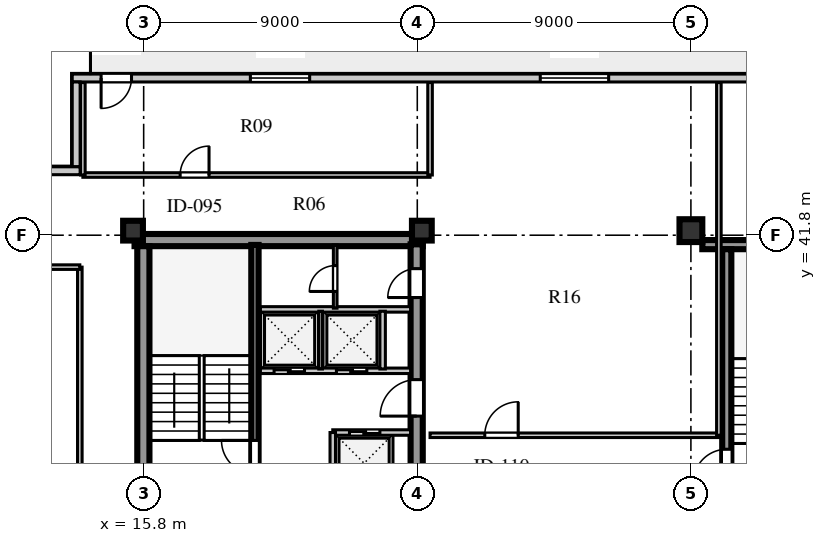
"""IFC4 building model, lengths in metres.
Left out: names, types, materials, properties, quantities, classifications, styles, units other than length and angle.
Written with IfcOpenShell. Run it as: python <this file> out.ifc"""

import sys

from ifc_helpers import new_model, si_unit, direction, frame, frame_2d, origin, origin_2d, place, context, subcontext, project, spatial, rectangle, extrude, element, fill, save


model = new_model("IFC4")
c1 = context("Model", 3, precision=1e-05, world=origin(), true_north=direction((0.0, 1.0)))
c2 = subcontext(c1, "Body", "Model", "MODEL_VIEW")
j1 = project(units=[si_unit("LENGTHUNIT", "METRE"), si_unit("PLANEANGLEUNIT", "RADIAN")], contexts=[c1])
p1 = place(None, origin())
s1 = spatial("IfcSite", under=j1, at=p1, CompositionType="ELEMENT")
p2 = place(p1, origin())
s2 = spatial("IfcBuilding", under=s1, at=p2, CompositionType="ELEMENT")
p3 = place(p2, frame((0.0, 0.0, 320.1)))
s3 = spatial("IfcBuildingStorey", under=s2, at=p3, CompositionType="ELEMENT", Elevation=320.1)
p4 = place(p3, frame((15.5, 41.64, 0.0), z_axis=(0.0, 0.0, 1.0), x_axis=(1.0, 0.0, 0.0)))
e1 = element("IfcWall", 1, at=p4, inside=s3, PredefinedType="SHEAR", context=c2, shape_type="SweptSolid", body=[
    extrude(rectangle(XDim=9.48, YDim=0.4, at=frame_2d((4.74, 0.0))), origin(), (0.0, 0.0, 1.0), 3.56),
])
p5 = place(p3, frame((15.79, 15.81, 0.0), z_axis=(0.0, 0.0, 1.0), x_axis=(0.0, 1.0, 0.0)))
e2 = element("IfcWall", 2, at=p5, inside=s3, PredefinedType="SHEAR", context=c2, shape_type="SweptSolid", body=[
    extrude(rectangle(XDim=25.63, YDim=0.4, at=frame_2d((12.815, 0.0))), origin(), (0.0, 0.0, 1.0), 3.56),
])
p6 = place(p3, frame((24.78, 15.74, 0.0), z_axis=(0.0, 0.0, 1.0), x_axis=(0.0, 1.0, 0.0)))
e3 = element("IfcWall", 3, at=p6, inside=s3, PredefinedType="SHEAR", context=c2, shape_type="SweptSolid", body=[
    extrude(rectangle(XDim=25.76, YDim=0.4, at=frame_2d((12.88, 0.0))), origin(), (0.0, 0.0, 1.0), 3.56),
])
p7 = place(p6, frame((1.61, 0.0, 0.0)))
e4 = element("IfcOpeningElement", 4, at=p7, cuts=e3, PredefinedType="OPENING", context=c2, shape_type="SweptSolid", body=[
    extrude(rectangle(XDim=1.2, YDim=2.1, at=frame_2d((0.6, 1.05))), frame((0.0, 0.21, 0.0), z_axis=(0.0, -1.0, 0.0), x_axis=(1.0, 0.0, 0.0)), (0.0, 0.0, 1.0), 0.42),
])
p8 = place(p6, frame((6.78, 0.0, 0.0)))
e5 = element("IfcOpeningElement", 5, at=p8, cuts=e3, PredefinedType="OPENING", context=c2, shape_type="SweptSolid", body=[
    extrude(rectangle(XDim=0.85, YDim=2.06, at=frame_2d((0.425, 1.03))), frame((0.0, 0.21, 0.0), z_axis=(0.0, -1.0, 0.0), x_axis=(1.0, 0.0, 0.0)), (0.0, 0.0, 1.0), 0.42),
])
p9 = place(p6, frame((12.11, 0.0, 0.0)))
e6 = element("IfcOpeningElement", 6, at=p9, cuts=e3, PredefinedType="OPENING", context=c2, shape_type="SweptSolid", body=[
    extrude(rectangle(XDim=1.5, YDim=2.12, at=frame_2d((0.75, 1.06))), frame((0.0, 0.21, 0.0), z_axis=(0.0, -1.0, 0.0), x_axis=(1.0, 0.0, 0.0)), (0.0, 0.0, 1.0), 0.42),
])
p10 = place(p6, frame((20.11, 0.0, 0.0)))
e7 = element("IfcOpeningElement", 7, at=p10, cuts=e3, PredefinedType="OPENING", context=c2, shape_type="SweptSolid", body=[
    extrude(rectangle(XDim=1.2, YDim=2.12, at=frame_2d((0.6, 1.06))), frame((0.0, 0.21, 0.0), z_axis=(0.0, -1.0, 0.0), x_axis=(1.0, 0.0, 0.0)), (0.0, 0.0, 1.0), 0.42),
])
p11 = place(p6, frame((24.01, 0.0, 0.0)))
e8 = element("IfcOpeningElement", 8, at=p11, cuts=e3, PredefinedType="OPENING", context=c2, shape_type="SweptSolid", body=[
    extrude(rectangle(XDim=0.95, YDim=2.1, at=frame_2d((0.475, 1.05))), frame((0.0, 0.21, 0.0), z_axis=(0.0, -1.0, 0.0), x_axis=(1.0, 0.0, 0.0)), (0.0, 0.0, 1.0), 0.42),
])
p12 = place(p3, frame((34.175, 41.49, 0.0), z_axis=(0.0, 0.0, 1.0), x_axis=(1.0, 0.0, 0.0)))
e9 = element("IfcWall", 9, at=p12, inside=s3, PredefinedType="SHEAR", context=c2, shape_type="SweptSolid", body=[
    extrude(rectangle(XDim=4.695, YDim=0.3, at=frame_2d((2.348, 0.0))), origin(), (0.0, 0.0, 1.0), 3.56),
])
p13 = place(p3, frame((34.98, 33.31, 0.0), z_axis=(0.0, 0.0, 1.0), x_axis=(0.0, 1.0, 0.0)))
e10 = element("IfcWall", 10, at=p13, inside=s3, PredefinedType="SHEAR", context=c2, shape_type="SweptSolid", body=[
    extrude(rectangle(XDim=8.03, YDim=0.3, at=frame_2d((4.015, 0.0))), origin(), (0.0, 0.0, 1.0), 3.56),
])
p14 = place(p13, frame((0.35, 0.0, 0.0)))
e11 = element("IfcOpeningElement", 11, at=p14, cuts=e10, PredefinedType="OPENING", context=c2, shape_type="SweptSolid", body=[
    extrude(rectangle(XDim=1.1, YDim=2.1, at=frame_2d((0.55, 1.05))), frame((0.0, 0.16, 0.0), z_axis=(0.0, -1.0, 0.0), x_axis=(1.0, 0.0, 0.0)), (0.0, 0.0, 1.0), 0.32),
])
for number, where, z_axis, x_axis in (
    (12, (15.45, 41.95, 0.0), (0.0, 0.0, 1.0), (1.0, 0.0, 0.0)),
    (13, (24.95, 41.95, 0.0), (0.0, 0.0, 1.0), (1.0, 0.0, 0.0)),
):
    element("IfcColumn", number, at=place(p3, frame(where, z_axis=z_axis, x_axis=x_axis)), inside=s3, PredefinedType="COLUMN", context=c2, shape_type="SweptSolid", body=[
        extrude(rectangle(XDim=0.65, YDim=0.65, at=origin_2d()), origin(), (0.0, 0.0, 1.0), 3.56),
    ])
p15 = place(p3, frame((33.8, 41.95, 0.0), z_axis=(0.0, 0.0, 1.0), x_axis=(1.0, 0.0, 0.0)))
e14 = element("IfcColumn", 14, at=p15, inside=s3, PredefinedType="COLUMN", context=c2, shape_type="SweptSolid", body=[
    extrude(rectangle(XDim=0.75, YDim=0.75, at=origin_2d()), origin(), (0.0, 0.0, 1.0), 3.56),
])
p16 = place(p3, frame((45.15, 46.97, 0.0), z_axis=(0.0, 0.0, 1.0), x_axis=(-1.0, 0.0, 0.0)))
e15 = element("IfcWall", 15, at=p16, inside=s3, PredefinedType="SOLIDWALL", context=c2, shape_type="SweptSolid", body=[
    extrude(rectangle(XDim=31.7, YDim=0.26, at=frame_2d((15.85, 0.0))), origin(), (0.0, 0.0, 1.0), 3.56),
])
p17 = place(p16, frame((29.75, 0.0, 0.0)))
e16 = element("IfcOpeningElement", 16, at=p17, cuts=e15, PredefinedType="OPENING", context=c2, shape_type="SweptSolid", body=[
    extrude(rectangle(XDim=1.0, YDim=2.05, at=frame_2d((0.5, 1.025))), frame((0.0, 0.14, 0.0), z_axis=(0.0, -1.0, 0.0), x_axis=(1.0, 0.0, 0.0)), (0.0, 0.0, 1.0), 0.28),
])
p18 = place(p16, frame((23.89, 0.0, 0.8)))
e17 = element("IfcOpeningElement", 17, at=p18, cuts=e15, PredefinedType="OPENING", context=c2, shape_type="SweptSolid", body=[
    extrude(rectangle(XDim=1.95, YDim=2.0, at=frame_2d((0.975, 1.0))), frame((0.0, 0.14, 0.0), z_axis=(0.0, -1.0, 0.0), x_axis=(1.0, 0.0, 0.0)), (0.0, 0.0, 1.0), 0.28),
])
p19 = place(p16, frame((14.055, 0.0, 0.8)))
e18 = element("IfcOpeningElement", 18, at=p19, cuts=e15, PredefinedType="OPENING", context=c2, shape_type="SweptSolid", body=[
    extrude(rectangle(XDim=2.25, YDim=2.0, at=frame_2d((1.125, 1.0))), frame((0.0, 0.14, 0.0), z_axis=(0.0, -1.0, 0.0), x_axis=(1.0, 0.0, 0.0)), (0.0, 0.0, 1.0), 0.28),
])
p20 = place(p16, frame((4.37, 0.0, 0.8)))
e19 = element("IfcOpeningElement", 19, at=p20, cuts=e15, PredefinedType="OPENING", context=c2, shape_type="SweptSolid", body=[
    extrude(rectangle(XDim=1.8, YDim=2.0, at=frame_2d((0.9, 1.0))), frame((0.0, 0.14, 0.0), z_axis=(0.0, -1.0, 0.0), x_axis=(1.0, 0.0, 0.0)), (0.0, 0.0, 1.0), 0.28),
])
p21 = place(p3, frame((13.58, 46.84, 0.0), z_axis=(0.0, 0.0, 1.0), x_axis=(0.0, -1.0, 0.0)))
e20 = element("IfcWall", 20, at=p21, inside=s3, PredefinedType="SOLIDWALL", context=c2, shape_type="SweptSolid", body=[
    extrude(rectangle(XDim=2.79, YDim=0.26, at=frame_2d((1.395, 0.0))), origin(), (0.0, 0.0, 1.0), 3.56),
])
p22 = place(p3, frame((13.71, 43.92, 0.0), z_axis=(0.0, 0.0, 1.0), x_axis=(-1.0, 0.0, 0.0)))
e21 = element("IfcWall", 21, at=p22, inside=s3, PredefinedType="SOLIDWALL", context=c2, shape_type="SweptSolid", body=[
    extrude(rectangle(XDim=3.31, YDim=0.26, at=frame_2d((1.655, 0.0))), origin(), (0.0, 0.0, 1.0), 3.56),
])
p23 = place(p3, frame((19.46, 33.3, 0.0), z_axis=(0.0, 0.0, 1.0), x_axis=(0.0, 1.0, 0.0)))
e22 = element("IfcWall", 22, at=p23, inside=s3, PredefinedType="SHEAR", context=c2, shape_type="SweptSolid", body=[
    extrude(rectangle(XDim=8.18, YDim=0.24, at=frame_2d((4.09, 0.0))), origin(), (0.0, 0.0, 1.0), 3.8),
])
p24 = place(p23, frame((0.65, 0.0, 0.0)))
e23 = element("IfcOpeningElement", 23, at=p24, cuts=e22, PredefinedType="OPENING", context=c2, shape_type="SweptSolid", body=[
    extrude(rectangle(XDim=1.1, YDim=2.1, at=frame_2d((0.55, 1.05))), frame((0.0, 0.13, 0.0), z_axis=(0.0, -1.0, 0.0), x_axis=(1.0, 0.0, 0.0)), (0.0, 0.0, 1.0), 0.26),
])
p25 = place(p3, frame((22.02, 35.31, 0.0), z_axis=(0.0, 0.0, 1.0), x_axis=(1.0, 0.0, 0.0)))
e24 = element("IfcWall", 24, at=p25, inside=s3, PredefinedType="SOLIDWALL", context=c2, shape_type="SweptSolid", body=[
    extrude(rectangle(XDim=2.56, YDim=0.18, at=frame_2d((1.28, 0.0))), origin(), (0.0, 0.0, 1.0), 3.56),
])
p26 = place(p25, frame((0.55, 0.0, 0.0)))
e25 = element("IfcOpeningElement", 25, at=p26, cuts=e24, PredefinedType="OPENING", context=c2, shape_type="SweptSolid", body=[
    extrude(rectangle(XDim=1.0, YDim=2.1, at=frame_2d((0.5, 1.05))), frame((0.0, 0.1, 0.0), z_axis=(0.0, -1.0, 0.0), x_axis=(1.0, 0.0, 0.0)), (0.0, 0.0, 1.0), 0.2),
])
p27 = place(p3, frame((22.02, 33.3, 0.0), z_axis=(0.0, 0.0, 1.0), x_axis=(0.0, 1.0, 0.0)))
e26 = element("IfcWall", 26, at=p27, inside=s3, PredefinedType="SOLIDWALL", context=c2, shape_type="SweptSolid", body=[
    extrude(rectangle(XDim=2.01, YDim=0.18, at=frame_2d((1.005, 0.0))), origin(), (0.0, 0.0, 1.0), 3.56),
])
p28 = place(p3, frame((19.64, 37.34, 0.0), z_axis=(0.0, 0.0, 1.0), x_axis=(1.0, 0.0, 0.0)))
e27 = element("IfcWall", 27, at=p28, inside=s3, PredefinedType="SOLIDWALL", context=c2, shape_type="SweptSolid", body=[
    extrude(rectangle(XDim=4.94, YDim=0.18, at=frame_2d((2.47, 0.0))), origin(), (0.0, 0.0, 1.0), 3.56),
])
p29 = place(p28, frame((0.45, 0.0, 0.0)))
e28 = element("IfcOpeningElement", 28, at=p29, cuts=e27, PredefinedType="OPENING", context=c2, shape_type="SweptSolid", body=[
    extrude(rectangle(XDim=1.0, YDim=2.1, at=frame_2d((0.5, 1.05))), frame((0.0, 0.1, 0.0), z_axis=(0.0, -1.0, 0.0), x_axis=(1.0, 0.0, 0.0)), (0.0, 0.0, 1.0), 0.2),
])
p30 = place(p28, frame((2.5, 0.0, 0.0)))
e29 = element("IfcOpeningElement", 29, at=p30, cuts=e27, PredefinedType="OPENING", context=c2, shape_type="SweptSolid", body=[
    extrude(rectangle(XDim=1.0, YDim=2.1, at=frame_2d((0.5, 1.05))), frame((0.0, 0.1, 0.0), z_axis=(0.0, -1.0, 0.0), x_axis=(1.0, 0.0, 0.0)), (0.0, 0.0, 1.0), 0.2),
])
p31 = place(p3, frame((19.64, 39.36, 0.0), z_axis=(0.0, 0.0, 1.0), x_axis=(1.0, 0.0, 0.0)))
e30 = element("IfcWall", 30, at=p31, inside=s3, PredefinedType="SOLIDWALL", context=c2, shape_type="SweptSolid", body=[
    extrude(rectangle(XDim=4.94, YDim=0.18, at=frame_2d((2.47, 0.0))), origin(), (0.0, 0.0, 1.0), 3.56),
])
p32 = place(p3, frame((21.62, 37.4, 0.0), z_axis=(0.0, 0.0, 1.0), x_axis=(0.0, 1.0, 0.0)))
e31 = element("IfcWall", 31, at=p32, inside=s3, PredefinedType="PARTITIONING", context=c2, shape_type="SweptSolid", body=[
    extrude(rectangle(XDim=1.9, YDim=0.12, at=frame_2d((0.95, 0.0))), origin(), (0.0, 0.0, 1.0), 3.56),
])
p33 = place(p3, frame((23.66, 37.4, 0.0), z_axis=(0.0, 0.0, 1.0), x_axis=(0.0, 1.0, 0.0)))
e32 = element("IfcWall", 32, at=p33, inside=s3, PredefinedType="SOLIDWALL", context=c2, shape_type="SweptSolid", body=[
    extrude(rectangle(XDim=1.9, YDim=0.18, at=frame_2d((0.95, 0.0))), origin(), (0.0, 0.0, 1.0), 3.56),
])
p34 = place(p3, frame((22.1, 39.4, 0.0), z_axis=(0.0, 0.0, 1.0), x_axis=(0.0, 1.0, 0.0)))
e33 = element("IfcWall", 33, at=p34, inside=s3, PredefinedType="PARTITIONING", context=c2, shape_type="SweptSolid", body=[
    extrude(rectangle(XDim=2.08, YDim=0.12, at=frame_2d((1.04, 0.0))), origin(), (0.0, 0.0, 1.0), 3.56),
])
p35 = place(p34, frame((0.55, 0.0, 0.0)))
e34 = element("IfcOpeningElement", 34, at=p35, cuts=e33, PredefinedType="OPENING", context=c2, shape_type="SweptSolid", body=[
    extrude(rectangle(XDim=0.85, YDim=2.06, at=frame_2d((0.425, 1.03))), frame((0.0, 0.07, 0.0), z_axis=(0.0, -1.0, 0.0), x_axis=(1.0, 0.0, 0.0)), (0.0, 0.0, 1.0), 0.14),
])
p36 = place(p3, frame((25.22, 35.22, 0.0), z_axis=(0.0, 0.0, 1.0), x_axis=(1.0, 0.0, 0.0)))
e35 = element("IfcWall", 35, at=p36, inside=s3, PredefinedType="PARTITIONING", context=c2, shape_type="SweptSolid", body=[
    extrude(rectangle(XDim=9.5, YDim=0.15, at=frame_2d((4.75, 0.0))), origin(), (0.0, 0.0, 1.0), 3.56),
])
p37 = place(p36, frame((1.8, 0.0, 0.0)))
e36 = element("IfcOpeningElement", 36, at=p37, cuts=e35, PredefinedType="OPENING", context=c2, shape_type="SweptSolid", body=[
    extrude(rectangle(XDim=1.1, YDim=2.08, at=frame_2d((0.55, 1.04))), frame((0.0, 0.085, 0.0), z_axis=(0.0, -1.0, 0.0), x_axis=(1.0, 0.0, 0.0)), (0.0, 0.0, 1.0), 0.17),
])
p38 = place(p3, frame((13.8, 43.78, 0.0), z_axis=(0.0, 0.0, 1.0), x_axis=(1.0, 0.0, 0.0)))
e37 = element("IfcWall", 37, at=p38, inside=s3, PredefinedType="PARTITIONING", context=c2, shape_type="SweptSolid", body=[
    extrude(rectangle(XDim=11.42, YDim=0.15, at=frame_2d((5.71, 0.0))), origin(), (0.0, 0.0, 1.0), 3.56),
])
p39 = place(p38, frame((3.2, 0.0, 0.0)))
e38 = element("IfcOpeningElement", 38, at=p39, cuts=e37, PredefinedType="OPENING", context=c2, shape_type="SweptSolid", body=[
    extrude(rectangle(XDim=0.95, YDim=2.08, at=frame_2d((0.475, 1.04))), frame((0.0, 0.085, 0.0), z_axis=(0.0, -1.0, 0.0), x_axis=(1.0, 0.0, 0.0)), (0.0, 0.0, 1.0), 0.17),
])
p40 = place(p3, frame((13.8, 43.78, 0.0), z_axis=(0.0, 0.0, 1.0), x_axis=(0.0, 1.0, 0.0)))
e39 = element("IfcWall", 39, at=p40, inside=s3, PredefinedType="PARTITIONING", context=c2, shape_type="SweptSolid", body=[
    extrude(rectangle(XDim=3.04, YDim=0.15, at=frame_2d((1.52, 0.0))), origin(), (0.0, 0.0, 1.0), 3.56),
])
p41 = place(p3, frame((25.22, 43.78, 0.0), z_axis=(0.0, 0.0, 1.0), x_axis=(0.0, 1.0, 0.0)))
e40 = element("IfcWall", 40, at=p41, inside=s3, PredefinedType="PARTITIONING", context=c2, shape_type="SweptSolid", body=[
    extrude(rectangle(XDim=3.04, YDim=0.15, at=frame_2d((1.52, 0.0))), origin(), (0.0, 0.0, 1.0), 3.11),
])
p42 = place(p3, frame((13.7, 16.45, 0.0), z_axis=(0.0, 0.0, 1.0), x_axis=(0.0, 1.0, 0.0)))
e41 = element("IfcWall", 41, at=p42, inside=s3, PredefinedType="PARTITIONING", context=c2, shape_type="SweptSolid", body=[
    extrude(rectangle(XDim=24.3, YDim=0.15, at=frame_2d((12.15, 0.0))), origin(), (0.0, 0.0, 1.0), 3.56),
])
p43 = place(p42, frame((5.1, 0.0, 0.0)))
e42 = element("IfcOpeningElement", 42, at=p43, cuts=e41, PredefinedType="OPENING", context=c2, shape_type="SweptSolid", body=[
    extrude(rectangle(XDim=0.95, YDim=2.08, at=frame_2d((0.475, 1.04))), frame((0.0, 0.085, 0.0), z_axis=(0.0, -1.0, 0.0), x_axis=(1.0, 0.0, 0.0)), (0.0, 0.0, 1.0), 0.17),
])
p44 = place(p3, frame((10.68, 40.75, 0.0), z_axis=(0.0, 0.0, 1.0), x_axis=(1.0, 0.0, 0.0)))
e43 = element("IfcWall", 43, at=p44, inside=s3, PredefinedType="PARTITIONING", context=c2, shape_type="SweptSolid", body=[
    extrude(rectangle(XDim=3.02, YDim=0.15, at=frame_2d((1.51, 0.0))), origin(), (0.0, 0.0, 1.0), 3.56),
])
p45 = place(p3, frame((34.72, 35.22, 0.0), z_axis=(0.0, 0.0, 1.0), x_axis=(0.0, 1.0, 0.0)))
e44 = element("IfcWall", 44, at=p45, inside=s3, PredefinedType="PARTITIONING", context=c2, shape_type="SweptSolid", body=[
    extrude(rectangle(XDim=11.6, YDim=0.15, at=frame_2d((5.8, 0.0))), origin(), (0.0, 0.0, 1.0), 3.56),
])
p46 = place(p17, frame((1.0, 0.0, 0.0), z_axis=(0.0, 0.0, 1.0), x_axis=(-1.0, 0.0, 0.0)))
e45 = element("IfcDoor", 45, at=p46, inside=s3, OperationType="SINGLE_SWING_LEFT", PredefinedType="DOOR", context=c2, shape_type="SweptSolid", body=[
    extrude(rectangle(XDim=1.0, YDim=2.05, at=frame_2d((0.5, 1.025))), frame((0.0, 0.025, 0.0), z_axis=(0.0, -1.0, 0.0), x_axis=(1.0, 0.0, 0.0)), (0.0, 0.0, 1.0), 0.05),
])
fill(e16, e45)
p47 = place(p18, origin())
e46 = element("IfcWindow", 46, at=p47, inside=s3, PartitioningType="SINGLE_PANEL", PredefinedType="WINDOW", context=c2, shape_type="SweptSolid", body=[
    extrude(rectangle(XDim=1.95, YDim=2.0, at=frame_2d((0.975, 1.0))), frame((0.0, 0.03, 0.0), z_axis=(0.0, -1.0, 0.0), x_axis=(1.0, 0.0, 0.0)), (0.0, 0.0, 1.0), 0.06),
])
fill(e17, e46)
p48 = place(p19, origin())
e47 = element("IfcWindow", 47, at=p48, inside=s3, PartitioningType="SINGLE_PANEL", PredefinedType="WINDOW", context=c2, shape_type="SweptSolid", body=[
    extrude(rectangle(XDim=2.25, YDim=2.0, at=frame_2d((1.125, 1.0))), frame((0.0, 0.03, 0.0), z_axis=(0.0, -1.0, 0.0), x_axis=(1.0, 0.0, 0.0)), (0.0, 0.0, 1.0), 0.06),
])
fill(e18, e47)
p49 = place(p24, origin())
e48 = element("IfcDoor", 48, at=p49, inside=s3, OperationType="SINGLE_SWING_RIGHT", PredefinedType="DOOR", context=c2, shape_type="SweptSolid", body=[
    extrude(rectangle(XDim=1.1, YDim=2.1, at=frame_2d((0.55, 1.05))), frame((0.0, 0.025, 0.0), z_axis=(0.0, -1.0, 0.0), x_axis=(1.0, 0.0, 0.0)), (0.0, 0.0, 1.0), 0.05),
])
fill(e23, e48)
p50 = place(p10, frame((1.2, 0.0, 0.0), z_axis=(0.0, 0.0, 1.0), x_axis=(-1.0, 0.0, 0.0)))
e49 = element("IfcDoor", 49, at=p50, inside=s3, OperationType="SINGLE_SWING_RIGHT", PredefinedType="DOOR", context=c2, shape_type="SweptSolid", body=[
    extrude(rectangle(XDim=1.2, YDim=2.12, at=frame_2d((0.6, 1.06))), frame((0.0, 0.025, 0.0), z_axis=(0.0, -1.0, 0.0), x_axis=(1.0, 0.0, 0.0)), (0.0, 0.0, 1.0), 0.05),
])
fill(e7, e49)
p51 = place(p29, frame((1.0, 0.0, 0.0), z_axis=(0.0, 0.0, 1.0), x_axis=(-1.0, 0.0, 0.0)))
e50 = element("IfcDoor", 50, at=p51, inside=s3, OperationType="DOUBLE_DOOR_SLIDING", PredefinedType="DOOR", context=c2, shape_type="SweptSolid", body=[
    extrude(rectangle(XDim=1.0, YDim=2.1, at=frame_2d((0.5, 1.05))), frame((0.0, 0.025, 0.0), z_axis=(0.0, -1.0, 0.0), x_axis=(1.0, 0.0, 0.0)), (0.0, 0.0, 1.0), 0.05),
])
fill(e28, e50)
p52 = place(p30, frame((1.0, 0.0, 0.0), z_axis=(0.0, 0.0, 1.0), x_axis=(-1.0, 0.0, 0.0)))
e51 = element("IfcDoor", 51, at=p52, inside=s3, OperationType="DOUBLE_DOOR_SLIDING", PredefinedType="DOOR", context=c2, shape_type="SweptSolid", body=[
    extrude(rectangle(XDim=1.0, YDim=2.1, at=frame_2d((0.5, 1.05))), frame((0.0, 0.025, 0.0), z_axis=(0.0, -1.0, 0.0), x_axis=(1.0, 0.0, 0.0)), (0.0, 0.0, 1.0), 0.05),
])
fill(e29, e51)
p53 = place(p26, origin())
e52 = element("IfcDoor", 52, at=p53, inside=s3, OperationType="DOUBLE_DOOR_SLIDING", PredefinedType="DOOR", context=c2, shape_type="SweptSolid", body=[
    extrude(rectangle(XDim=1.0, YDim=2.1, at=frame_2d((0.5, 1.05))), frame((0.0, 0.025, 0.0), z_axis=(0.0, -1.0, 0.0), x_axis=(1.0, 0.0, 0.0)), (0.0, 0.0, 1.0), 0.05),
])
fill(e25, e52)
p54 = place(p35, origin())
e53 = element("IfcDoor", 53, at=p54, inside=s3, OperationType="SINGLE_SWING_LEFT", PredefinedType="DOOR", context=c2, shape_type="SweptSolid", body=[
    extrude(rectangle(XDim=0.85, YDim=2.06, at=frame_2d((0.425, 1.03))), frame((0.0, 0.025, 0.0), z_axis=(0.0, -1.0, 0.0), x_axis=(1.0, 0.0, 0.0)), (0.0, 0.0, 1.0), 0.05),
])
fill(e34, e53)
p55 = place(p11, frame((0.95, 0.0, 0.0), z_axis=(0.0, 0.0, 1.0), x_axis=(-1.0, 0.0, 0.0)))
e54 = element("IfcDoor", 54, at=p55, inside=s3, OperationType="SINGLE_SWING_RIGHT", PredefinedType="DOOR", context=c2, shape_type="SweptSolid", body=[
    extrude(rectangle(XDim=0.95, YDim=2.1, at=frame_2d((0.475, 1.05))), frame((0.0, 0.025, 0.0), z_axis=(0.0, -1.0, 0.0), x_axis=(1.0, 0.0, 0.0)), (0.0, 0.0, 1.0), 0.05),
])
fill(e8, e54)
p56 = place(p14, origin())
e55 = element("IfcDoor", 55, at=p56, inside=s3, OperationType="SINGLE_SWING_LEFT", PredefinedType="DOOR", context=c2, shape_type="SweptSolid", body=[
    extrude(rectangle(XDim=1.1, YDim=2.1, at=frame_2d((0.55, 1.05))), frame((0.0, 0.025, 0.0), z_axis=(0.0, -1.0, 0.0), x_axis=(1.0, 0.0, 0.0)), (0.0, 0.0, 1.0), 0.05),
])
fill(e11, e55)
p57 = place(p39, origin())
e56 = element("IfcDoor", 56, at=p57, inside=s3, OperationType="SINGLE_SWING_RIGHT", PredefinedType="DOOR", context=c2, shape_type="SweptSolid", body=[
    extrude(rectangle(XDim=0.95, YDim=2.08, at=frame_2d((0.475, 1.04))), frame((0.0, 0.025, 0.0), z_axis=(0.0, -1.0, 0.0), x_axis=(1.0, 0.0, 0.0)), (0.0, 0.0, 1.0), 0.05),
])
fill(e38, e56)
p58 = place(p37, origin())
e57 = element("IfcDoor", 57, at=p58, inside=s3, OperationType="SINGLE_SWING_RIGHT", PredefinedType="DOOR", context=c2, shape_type="SweptSolid", body=[
    extrude(rectangle(XDim=1.1, YDim=2.08, at=frame_2d((0.55, 1.04))), frame((0.0, 0.025, 0.0), z_axis=(0.0, -1.0, 0.0), x_axis=(1.0, 0.0, 0.0)), (0.0, 0.0, 1.0), 0.05),
])
fill(e36, e57)
save(model, sys.argv[1])
